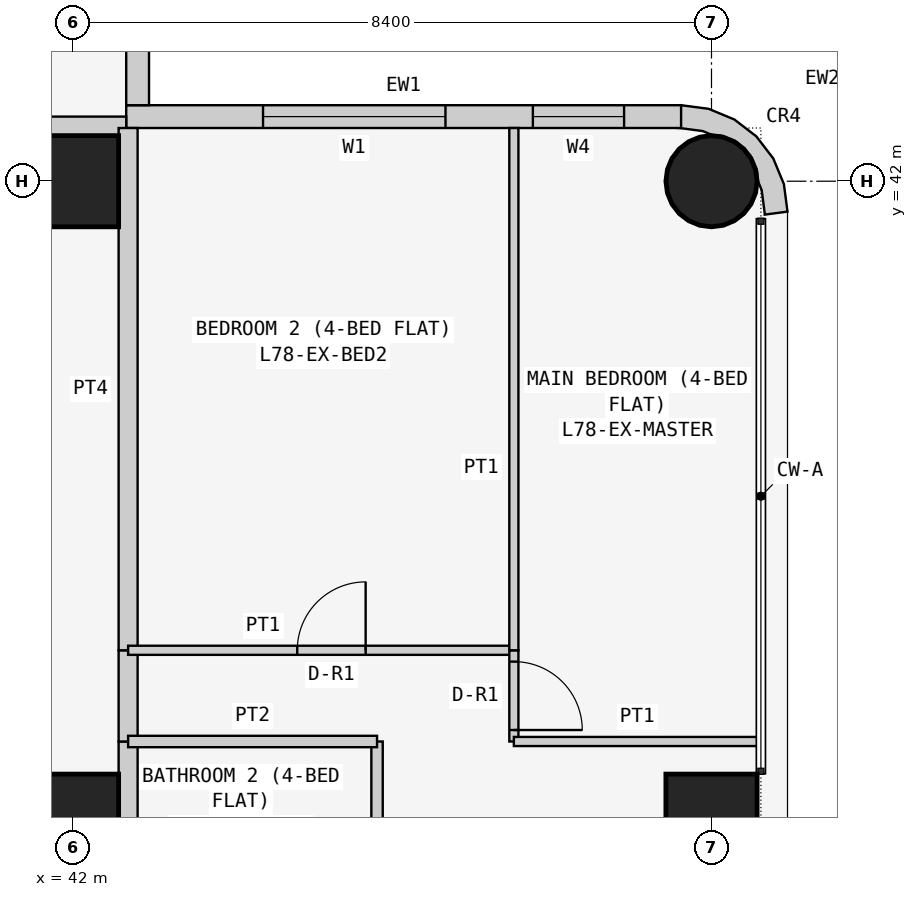
"""IFC4 building model, lengths in metres.
Left out: names, types, materials, properties, quantities, classifications, styles, units other than length and angle.
Written with IfcOpenShell. Run it as: python <this file> out.ifc"""

import sys

from ifc_helpers import new_model, si_unit, direction, frame, frame_2d, origin, origin_2d, place, context, subcontext, project, spatial, polyline, rectangle, circle, outline, extrude, element, fill, save


model = new_model("IFC4")
c1 = context("Model", 3, precision=1e-05, world=origin(), true_north=direction((0.0, 1.0)))
c2 = subcontext(c1, "Body", "Model", "MODEL_VIEW")
j1 = project(units=[si_unit("LENGTHUNIT", "METRE"), si_unit("PLANEANGLEUNIT", "RADIAN")], contexts=[c1])
p1 = place(None, origin())
s1 = spatial("IfcSite", under=j1, at=p1, CompositionType="ELEMENT")
p2 = place(p1, origin())
s2 = spatial("IfcBuilding", under=s1, at=p2, CompositionType="ELEMENT")
p3 = place(p2, frame((0.0, 0.0, 297.3)))
s3 = spatial("IfcBuildingStorey", under=s2, at=p3, CompositionType="ELEMENT", Elevation=297.3)
for number, where, z_axis, x_axis in (
    (1, (42.0, 33.6, 0.0), (0.0, 0.0, 1.0), (1.0, 0.0, 0.0)),
    (2, (42.0, 42.0, 0.0), (0.0, 0.0, 1.0), (1.0, 0.0, 0.0)),
    (3, (50.4, 33.6, 0.0), (0.0, 0.0, 1.0), (1.0, 0.0, 0.0)),
):
    element("IfcColumn", number, at=place(p3, frame(where, z_axis=z_axis, x_axis=x_axis)), inside=s3, PredefinedType="COLUMN", context=c2, shape_type="SweptSolid", body=[
        extrude(rectangle(XDim=1.2, YDim=1.2, at=origin_2d()), origin(), (0.0, 0.0, 1.0), 3.6),
    ])
p4 = place(p3, frame((50.4, 42.0, 0.0), z_axis=(0.0, 0.0, 1.0), x_axis=(1.0, 0.0, 0.0)))
e4 = element("IfcColumn", 4, at=p4, inside=s3, PredefinedType="COLUMN", context=c2, shape_type="SweptSolid", body=[
    extrude(circle(Radius=0.6, at=origin_2d()), origin(), (0.0, 0.0, 1.0), 3.6),
])
p5 = place(p3, frame((50.0, 42.85, 0.0), z_axis=(0.0, 0.0, 1.0), x_axis=(-1.0, 0.0, 0.0)))
e5 = element("IfcWall", 5, at=p5, inside=s3, PredefinedType="SOLIDWALL", context=c2, shape_type="SweptSolid", body=[
    extrude(rectangle(XDim=7.3, YDim=0.3, at=frame_2d((3.65, 0.0))), origin(), (0.0, 0.0, 1.0), 3.35),
])
p6 = place(p5, frame((3.1, 0.0, 0.9)))
e6 = element("IfcOpeningElement", 6, at=p6, cuts=e5, PredefinedType="OPENING", context=c2, shape_type="SweptSolid", body=[
    extrude(rectangle(XDim=2.4, YDim=1.5, at=frame_2d((1.2, 0.75))), frame((0.0, 0.16, 0.0), z_axis=(0.0, -1.0, 0.0), x_axis=(1.0, 0.0, 0.0)), (0.0, 0.0, 1.0), 0.32),
])
p7 = place(p5, frame((0.75, 0.0, 0.9)))
e7 = element("IfcOpeningElement", 7, at=p7, cuts=e5, PredefinedType="OPENING", context=c2, shape_type="SweptSolid", body=[
    extrude(rectangle(XDim=1.2, YDim=1.5, at=frame_2d((0.6, 0.75))), frame((0.0, 0.16, 0.0), z_axis=(0.0, -1.0, 0.0), x_axis=(1.0, 0.0, 0.0)), (0.0, 0.0, 1.0), 0.32),
])
p8 = place(p3, frame((42.85, 43.0, 0.0), z_axis=(0.0, 0.0, 1.0), x_axis=(0.0, 1.0, 0.0)))
e8 = element("IfcWall", 8, at=p8, inside=s3, PredefinedType="SOLIDWALL", context=c2, shape_type="SweptSolid", body=[
    extrude(rectangle(XDim=7.0, YDim=0.3, at=frame_2d((3.5, 0.0))), origin(), (0.0, 0.0, 1.0), 3.35),
])
p9 = place(p8, frame((1.5, 0.0, 0.9)))
e9 = element("IfcOpeningElement", 9, at=p9, cuts=e8, PredefinedType="OPENING", context=c2, shape_type="SweptSolid", body=[
    extrude(rectangle(XDim=2.4, YDim=1.5, at=frame_2d((1.2, 0.75))), frame((0.0, 0.16, 0.0), z_axis=(0.0, -1.0, 0.0), x_axis=(1.0, 0.0, 0.0)), (0.0, 0.0, 1.0), 0.32),
])
p10 = place(p8, frame((5.05, 0.0, 0.9)))
e10 = element("IfcOpeningElement", 10, at=p10, cuts=e8, PredefinedType="OPENING", context=c2, shape_type="SweptSolid", body=[
    extrude(rectangle(XDim=1.2, YDim=1.5, at=frame_2d((0.6, 0.75))), frame((0.0, 0.16, 0.0), z_axis=(0.0, -1.0, 0.0), x_axis=(1.0, 0.0, 0.0)), (0.0, 0.0, 1.0), 0.32),
])
p11 = place(p3, frame((50.976, 41.638, 0.0), z_axis=(0.0, 0.0, 1.0), x_axis=(0.707106781187, 0.707106781187, 0.0)))
e11 = element("IfcWall", 11, at=p11, inside=s3, PredefinedType="SOLIDWALL", context=c2, shape_type="SweptSolid", body=[
    extrude(outline(polyline([(0.233, 0.114), (0.047, -0.129), (0.033, -0.143), (0.273, -0.327), (0.495, -0.037), (0.635, 0.301), (0.683, 0.663), (0.635, 1.025), (0.495, 1.363), (0.273, 1.653), (0.033, 1.469), (0.047, 1.455), (0.233, 1.212), (0.292, 1.069), (0.358, 1.003), (0.449, 0.782), (0.449, 0.543), (0.358, 0.322), (0.292, 0.257), (0.233, 0.114)])), origin(), (0.0, 0.0, 1.0), 3.35),
])
p12 = place(p3, frame((35.829, 42.725, 0.0), z_axis=(0.0, 0.0, 1.0), x_axis=(1.0, 0.0, 0.0)))
e12 = element("IfcWall", 12, at=p12, inside=s3, PredefinedType="PARTITIONING", context=c2, shape_type="SweptSolid", body=[
    extrude(rectangle(XDim=6.871, YDim=0.25, at=frame_2d((3.436, 0.0))), origin(), (0.0, 0.0, 1.0), 3.35),
])
p13 = place(p3, frame((42.725, 34.629, 0.0), z_axis=(0.0, 0.0, 1.0), x_axis=(0.0, -1.0, 0.0)))
e13 = element("IfcWall", 13, at=p13, inside=s3, PredefinedType="PARTITIONING", context=c2, shape_type="SweptSolid", body=[
    extrude(rectangle(XDim=2.629, YDim=0.25, at=frame_2d((1.314, 0.0))), origin(), (0.0, 0.0, 1.0), 3.35),
])
p14 = place(p3, frame((42.725, 35.829, 0.0), z_axis=(0.0, 0.0, 1.0), x_axis=(0.0, -1.0, 0.0)))
e14 = element("IfcWall", 14, at=p14, inside=s3, PredefinedType="PARTITIONING", context=c2, shape_type="SweptSolid", body=[
    extrude(rectangle(XDim=1.2, YDim=0.25, at=frame_2d((0.6, 0.0))), origin(), (0.0, 0.0, 1.0), 3.35),
])
p15 = place(p3, frame((42.725, 42.7, 0.0), z_axis=(0.0, 0.0, 1.0), x_axis=(0.0, -1.0, 0.0)))
e15 = element("IfcWall", 15, at=p15, inside=s3, PredefinedType="PARTITIONING", context=c2, shape_type="SweptSolid", body=[
    extrude(rectangle(XDim=6.871, YDim=0.25, at=frame_2d((3.436, 0.0))), origin(), (0.0, 0.0, 1.0), 3.35),
])
p16 = place(p3, frame((46.0, 32.0, 0.0), z_axis=(0.0, 0.0, 1.0), x_axis=(0.0, 1.0, 0.0)))
e16 = element("IfcWall", 16, at=p16, inside=s3, PredefinedType="PARTITIONING", context=c2, shape_type="SweptSolid", body=[
    extrude(rectangle(XDim=2.629, YDim=0.15, at=frame_2d((1.314, 0.0))), origin(), (0.0, 0.0, 1.0), 3.35),
])
p17 = place(p3, frame((46.0, 34.629, 0.0), z_axis=(0.0, 0.0, 1.0), x_axis=(-1.0, 0.0, 0.0)))
e17 = element("IfcWall", 17, at=p17, inside=s3, PredefinedType="PARTITIONING", context=c2, shape_type="SweptSolid", body=[
    extrude(rectangle(XDim=3.275, YDim=0.15, at=frame_2d((1.637, 0.0))), origin(), (0.0, 0.0, 1.0), 3.35),
])
p18 = place(p3, frame((42.725, 35.829, 0.0), z_axis=(0.0, 0.0, 1.0), x_axis=(1.0, 0.0, 0.0)))
e18 = element("IfcWall", 18, at=p18, inside=s3, PredefinedType="PARTITIONING", context=c2, shape_type="SweptSolid", body=[
    extrude(rectangle(XDim=5.075, YDim=0.12, at=frame_2d((2.538, 0.0))), origin(), (0.0, 0.0, 1.0), 3.35),
])
p19 = place(p18, frame((2.225, 0.0, 0.0)))
e19 = element("IfcOpeningElement", 19, at=p19, cuts=e18, PredefinedType="OPENING", context=c2, shape_type="SweptSolid", body=[
    extrude(rectangle(XDim=0.9, YDim=2.1, at=frame_2d((0.45, 1.05))), frame((0.0, 0.07, 0.0), z_axis=(0.0, -1.0, 0.0), x_axis=(1.0, 0.0, 0.0)), (0.0, 0.0, 1.0), 0.14),
])
p20 = place(p3, frame((47.8, 35.829, 0.0), z_axis=(0.0, 0.0, 1.0), x_axis=(0.0, -1.0, 0.0)))
e20 = element("IfcWall", 20, at=p20, inside=s3, PredefinedType="PARTITIONING", context=c2, shape_type="SweptSolid", body=[
    extrude(rectangle(XDim=1.2, YDim=0.12, at=frame_2d((0.6, 0.0))), origin(), (0.0, 0.0, 1.0), 3.35),
])
p21 = place(p20, frame((0.149, 0.0, 0.0)))
e21 = element("IfcOpeningElement", 21, at=p21, cuts=e20, PredefinedType="OPENING", context=c2, shape_type="SweptSolid", body=[
    extrude(rectangle(XDim=0.9, YDim=2.1, at=frame_2d((0.45, 1.05))), frame((0.0, 0.07, 0.0), z_axis=(0.0, -1.0, 0.0), x_axis=(1.0, 0.0, 0.0)), (0.0, 0.0, 1.0), 0.14),
])
p22 = place(p3, frame((47.8, 34.629, 0.0), z_axis=(0.0, 0.0, 1.0), x_axis=(1.0, 0.0, 0.0)))
e22 = element("IfcWall", 22, at=p22, inside=s3, PredefinedType="PARTITIONING", context=c2, shape_type="SweptSolid", body=[
    extrude(rectangle(XDim=3.25, YDim=0.12, at=frame_2d((1.625, 0.0))), origin(), (0.0, 0.0, 1.0), 3.35),
])
p23 = place(p3, frame((47.8, 35.829, 0.0), z_axis=(0.0, 0.0, 1.0), x_axis=(0.0, 1.0, 0.0)))
e23 = element("IfcWall", 23, at=p23, inside=s3, PredefinedType="PARTITIONING", context=c2, shape_type="SweptSolid", body=[
    extrude(rectangle(XDim=6.871, YDim=0.12, at=frame_2d((3.436, 0.0))), origin(), (0.0, 0.0, 1.0), 3.35),
])
p24 = place(p6, origin())
e24 = element("IfcWindow", 24, at=p24, inside=s3, PartitioningType="SINGLE_PANEL", PredefinedType="WINDOW", context=c2, shape_type="SweptSolid", body=[
    extrude(rectangle(XDim=2.4, YDim=1.5, at=frame_2d((1.2, 0.75))), frame((0.0, 0.03, 0.0), z_axis=(0.0, -1.0, 0.0), x_axis=(1.0, 0.0, 0.0)), (0.0, 0.0, 1.0), 0.06),
])
fill(e6, e24)
p25 = place(p7, origin())
e25 = element("IfcWindow", 25, at=p25, inside=s3, PartitioningType="SINGLE_PANEL", PredefinedType="WINDOW", context=c2, shape_type="SweptSolid", body=[
    extrude(rectangle(XDim=1.2, YDim=1.5, at=frame_2d((0.6, 0.75))), frame((0.0, 0.03, 0.0), z_axis=(0.0, -1.0, 0.0), x_axis=(1.0, 0.0, 0.0)), (0.0, 0.0, 1.0), 0.06),
])
fill(e7, e25)
p26 = place(p19, origin())
e26 = element("IfcDoor", 26, at=p26, inside=s3, OperationType="SINGLE_SWING_RIGHT", PredefinedType="DOOR", context=c2, shape_type="SweptSolid", body=[
    extrude(rectangle(XDim=0.9, YDim=2.1, at=frame_2d((0.45, 1.05))), frame((0.0, 0.025, 0.0), z_axis=(0.0, -1.0, 0.0), x_axis=(1.0, 0.0, 0.0)), (0.0, 0.0, 1.0), 0.05),
])
fill(e19, e26)
p27 = place(p21, origin())
e27 = element("IfcDoor", 27, at=p27, inside=s3, OperationType="SINGLE_SWING_RIGHT", PredefinedType="DOOR", context=c2, shape_type="SweptSolid", body=[
    extrude(rectangle(XDim=0.9, YDim=2.1, at=frame_2d((0.45, 1.05))), frame((0.0, 0.025, 0.0), z_axis=(0.0, -1.0, 0.0), x_axis=(1.0, 0.0, 0.0)), (0.0, 0.0, 1.0), 0.05),
])
fill(e21, e27)
save(model, sys.argv[1])
